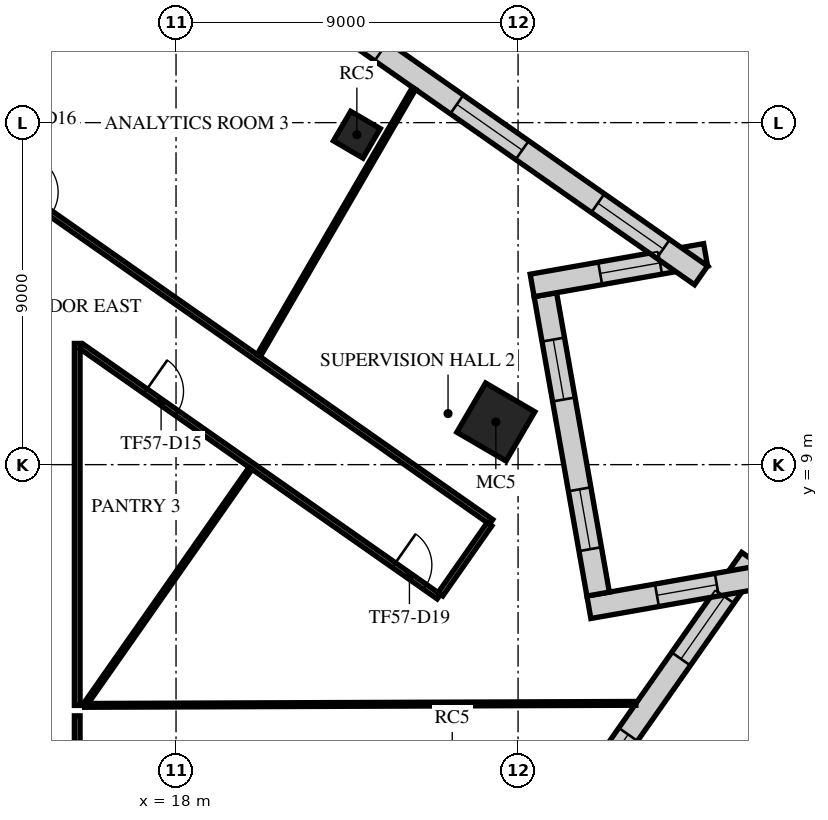
"""IFC4 building model, lengths in metres.
Left out: names, types, materials, properties, quantities, classifications, styles, units other than length and angle.
Written with IfcOpenShell. Run it as: python <this file> out.ifc"""

import sys

from ifc_helpers import new_model, si_unit, direction, frame, frame_2d, origin, origin_2d, place, context, subcontext, project, spatial, rectangle, extrude, element, fill, save


model = new_model("IFC4")
c1 = context("Model", 3, precision=1e-05, world=origin(), true_north=direction((0.0, 1.0)))
c2 = subcontext(c1, "Body", "Model", "MODEL_VIEW")
j1 = project(units=[si_unit("LENGTHUNIT", "METRE"), si_unit("PLANEANGLEUNIT", "RADIAN")], contexts=[c1])
p1 = place(None, origin())
s1 = spatial("IfcSite", under=j1, at=p1, CompositionType="ELEMENT")
p2 = place(p1, origin())
s2 = spatial("IfcBuilding", under=s1, at=p2, CompositionType="ELEMENT")
p3 = place(p2, frame((0.0, 0.0, 242.9)))
s3 = spatial("IfcBuildingStorey", under=s2, at=p3, CompositionType="ELEMENT", Elevation=242.9)
p4 = place(p3, frame((26.415, 10.122, -0.36), z_axis=(0.0, 0.0, 1.0), x_axis=(0.504643651291, 0.863327739165, 0.0)))
e1 = element("IfcColumn", 1, at=p4, inside=s3, PredefinedType="COLUMN", context=c2, shape_type="SweptSolid", body=[
    extrude(rectangle(XDim=1.5, YDim=1.5, at=origin_2d()), origin(), (0.0, 0.0, 1.0), 4.36),
])
p5 = place(p3, frame((22.758, 17.682, -0.36), z_axis=(0.0, 0.0, 1.0), x_axis=(0.504643651291, 0.863327739165, 0.0)))
e2 = element("IfcColumn", 2, at=p5, inside=s3, PredefinedType="COLUMN", context=c2, shape_type="SweptSolid", body=[
    extrude(rectangle(XDim=0.9, YDim=0.9, at=origin_2d()), origin(), (0.0, 0.0, 1.0), 4.36),
])
p6 = place(p3, frame((5.206, -33.362, 0.0), z_axis=(0.0, 0.0, 1.0), x_axis=(0.573577438409, 0.81915134264, 0.0)))
e3 = element("IfcWall", 3, at=p6, inside=s3, PredefinedType="STANDARD", context=c2, shape_type="SweptSolid", body=[
    extrude(rectangle(XDim=48.686, YDim=0.6, at=frame_2d((24.343, 0.0))), origin(), (0.0, 0.0, 1.0), 3.64),
])
p7 = place(p6, frame((1.213, 0.0, 0.9)))
e4 = element("IfcOpeningElement", 4, at=p7, cuts=e3, PredefinedType="OPENING", context=c2, shape_type="SweptSolid", body=[
    extrude(rectangle(XDim=2.0, YDim=2.1, at=frame_2d((1.0, 1.05))), frame((0.0, 0.31, 0.0), z_axis=(0.0, -1.0, 0.0), x_axis=(1.0, 0.0, 0.0)), (0.0, 0.0, 1.0), 0.62),
])
p8 = place(p6, frame((5.639, 0.0, 0.9)))
e5 = element("IfcOpeningElement", 5, at=p8, cuts=e3, PredefinedType="OPENING", context=c2, shape_type="SweptSolid", body=[
    extrude(rectangle(XDim=2.0, YDim=2.1, at=frame_2d((1.0, 1.05))), frame((0.0, 0.31, 0.0), z_axis=(0.0, -1.0, 0.0), x_axis=(1.0, 0.0, 0.0)), (0.0, 0.0, 1.0), 0.62),
])
p9 = place(p6, frame((10.065, 0.0, 0.9)))
e6 = element("IfcOpeningElement", 6, at=p9, cuts=e3, PredefinedType="OPENING", context=c2, shape_type="SweptSolid", body=[
    extrude(rectangle(XDim=2.0, YDim=2.1, at=frame_2d((1.0, 1.05))), frame((0.0, 0.31, 0.0), z_axis=(0.0, -1.0, 0.0), x_axis=(1.0, 0.0, 0.0)), (0.0, 0.0, 1.0), 0.62),
])
p10 = place(p6, frame((14.491, 0.0, 0.9)))
e7 = element("IfcOpeningElement", 7, at=p10, cuts=e3, PredefinedType="OPENING", context=c2, shape_type="SweptSolid", body=[
    extrude(rectangle(XDim=2.0, YDim=2.1, at=frame_2d((1.0, 1.05))), frame((0.0, 0.31, 0.0), z_axis=(0.0, -1.0, 0.0), x_axis=(1.0, 0.0, 0.0)), (0.0, 0.0, 1.0), 0.62),
])
p11 = place(p6, frame((18.917, 0.0, 0.9)))
e8 = element("IfcOpeningElement", 8, at=p11, cuts=e3, PredefinedType="OPENING", context=c2, shape_type="SweptSolid", body=[
    extrude(rectangle(XDim=2.0, YDim=2.1, at=frame_2d((1.0, 1.05))), frame((0.0, 0.31, 0.0), z_axis=(0.0, -1.0, 0.0), x_axis=(1.0, 0.0, 0.0)), (0.0, 0.0, 1.0), 0.62),
])
p12 = place(p6, frame((23.343, 0.0, 0.9)))
e9 = element("IfcOpeningElement", 9, at=p12, cuts=e3, PredefinedType="OPENING", context=c2, shape_type="SweptSolid", body=[
    extrude(rectangle(XDim=2.0, YDim=2.1, at=frame_2d((1.0, 1.05))), frame((0.0, 0.31, 0.0), z_axis=(0.0, -1.0, 0.0), x_axis=(1.0, 0.0, 0.0)), (0.0, 0.0, 1.0), 0.62),
])
p13 = place(p6, frame((27.769, 0.0, 0.9)))
e10 = element("IfcOpeningElement", 10, at=p13, cuts=e3, PredefinedType="OPENING", context=c2, shape_type="SweptSolid", body=[
    extrude(rectangle(XDim=2.0, YDim=2.1, at=frame_2d((1.0, 1.05))), frame((0.0, 0.31, 0.0), z_axis=(0.0, -1.0, 0.0), x_axis=(1.0, 0.0, 0.0)), (0.0, 0.0, 1.0), 0.62),
])
p14 = place(p6, frame((32.195, 0.0, 0.9)))
e11 = element("IfcOpeningElement", 11, at=p14, cuts=e3, PredefinedType="OPENING", context=c2, shape_type="SweptSolid", body=[
    extrude(rectangle(XDim=2.0, YDim=2.1, at=frame_2d((1.0, 1.05))), frame((0.0, 0.31, 0.0), z_axis=(0.0, -1.0, 0.0), x_axis=(1.0, 0.0, 0.0)), (0.0, 0.0, 1.0), 0.62),
])
p15 = place(p6, frame((36.621, 0.0, 0.9)))
e12 = element("IfcOpeningElement", 12, at=p15, cuts=e3, PredefinedType="OPENING", context=c2, shape_type="SweptSolid", body=[
    extrude(rectangle(XDim=2.0, YDim=2.1, at=frame_2d((1.0, 1.05))), frame((0.0, 0.31, 0.0), z_axis=(0.0, -1.0, 0.0), x_axis=(1.0, 0.0, 0.0)), (0.0, 0.0, 1.0), 0.62),
])
p16 = place(p6, frame((41.047, 0.0, 0.9)))
e13 = element("IfcOpeningElement", 13, at=p16, cuts=e3, PredefinedType="OPENING", context=c2, shape_type="SweptSolid", body=[
    extrude(rectangle(XDim=2.0, YDim=2.1, at=frame_2d((1.0, 1.05))), frame((0.0, 0.31, 0.0), z_axis=(0.0, -1.0, 0.0), x_axis=(1.0, 0.0, 0.0)), (0.0, 0.0, 1.0), 0.62),
])
p17 = place(p6, frame((45.473, 0.0, 0.9)))
e14 = element("IfcOpeningElement", 14, at=p17, cuts=e3, PredefinedType="OPENING", context=c2, shape_type="SweptSolid", body=[
    extrude(rectangle(XDim=2.0, YDim=2.1, at=frame_2d((1.0, 1.05))), frame((0.0, 0.31, 0.0), z_axis=(0.0, -1.0, 0.0), x_axis=(1.0, 0.0, 0.0)), (0.0, 0.0, 1.0), 0.62),
])
p18 = place(p3, frame((33.429, 6.052, 0.0), z_axis=(0.0, 0.0, 1.0), x_axis=(-0.984808997794, -0.173641118013, 0.0)))
e15 = element("IfcWall", 15, at=p18, inside=s3, PredefinedType="STANDARD", context=c2, shape_type="SweptSolid", body=[
    extrude(rectangle(XDim=4.635, YDim=0.6, at=frame_2d((2.318, 0.0))), origin(), (0.0, 0.0, 1.0), 3.64),
])
p19 = place(p18, frame((1.218, 0.0, 0.9)))
e16 = element("IfcOpeningElement", 16, at=p19, cuts=e15, PredefinedType="OPENING", context=c2, shape_type="SweptSolid", body=[
    extrude(rectangle(XDim=1.6, YDim=2.1, at=frame_2d((0.8, 1.05))), frame((0.0, 0.31, 0.0), z_axis=(0.0, -1.0, 0.0), x_axis=(1.0, 0.0, 0.0)), (0.0, 0.0, 1.0), 0.62),
])
p20 = place(p3, frame((29.107, 5.594, 0.0), z_axis=(0.0, 0.0, 1.0), x_axis=(-0.173640837858, 0.98480904719, 0.0)))
e17 = element("IfcWall", 17, at=p20, inside=s3, PredefinedType="STANDARD", context=c2, shape_type="SweptSolid", body=[
    extrude(rectangle(XDim=8.0, YDim=0.6, at=frame_2d((4.0, 0.0))), origin(), (0.0, 0.0, 1.0), 3.64),
])
p21 = place(p20, frame((1.2, 0.0, 0.9)))
e18 = element("IfcOpeningElement", 18, at=p21, cuts=e17, PredefinedType="OPENING", context=c2, shape_type="SweptSolid", body=[
    extrude(rectangle(XDim=1.6, YDim=2.1, at=frame_2d((0.8, 1.05))), frame((0.0, 0.31, 0.0), z_axis=(0.0, -1.0, 0.0), x_axis=(1.0, 0.0, 0.0)), (0.0, 0.0, 1.0), 0.62),
])
p22 = place(p20, frame((5.2, 0.0, 0.9)))
e19 = element("IfcOpeningElement", 19, at=p22, cuts=e17, PredefinedType="OPENING", context=c2, shape_type="SweptSolid", body=[
    extrude(rectangle(XDim=1.6, YDim=2.1, at=frame_2d((0.8, 1.05))), frame((0.0, 0.31, 0.0), z_axis=(0.0, -1.0, 0.0), x_axis=(1.0, 0.0, 0.0)), (0.0, 0.0, 1.0), 0.62),
])
p23 = place(p3, frame((27.37, 13.716, 0.0), z_axis=(0.0, 0.0, 1.0), x_axis=(0.984799990421, 0.173692195754, 0.0)))
e20 = element("IfcWall", 20, at=p23, inside=s3, PredefinedType="STANDARD", context=c2, shape_type="SweptSolid", body=[
    extrude(rectangle(XDim=4.636, YDim=0.6, at=frame_2d((2.318, 0.0))), origin(), (0.0, 0.0, 1.0), 3.64),
])
p24 = place(p23, frame((1.818, 0.0, 0.9)))
e21 = element("IfcOpeningElement", 21, at=p24, cuts=e20, PredefinedType="OPENING", context=c2, shape_type="SweptSolid", body=[
    extrude(rectangle(XDim=1.6, YDim=2.1, at=frame_2d((0.8, 1.05))), frame((0.0, 0.31, 0.0), z_axis=(0.0, -1.0, 0.0), x_axis=(1.0, 0.0, 0.0)), (0.0, 0.0, 1.0), 0.62),
])
p25 = place(p3, frame((31.815, 13.98, 0.0), z_axis=(0.0, 0.0, 1.0), x_axis=(-0.819152162902, 0.573576266955, 0.0)))
e22 = element("IfcWall", 22, at=p25, inside=s3, PredefinedType="STANDARD", context=c2, shape_type="SweptSolid", body=[
    extrude(rectangle(XDim=36.243, YDim=0.6, at=frame_2d((18.122, 0.0))), origin(), (0.0, 0.0, 1.0), 3.64),
])
p26 = place(p25, frame((1.215, 0.0, 0.9)))
e23 = element("IfcOpeningElement", 23, at=p26, cuts=e22, PredefinedType="OPENING", context=c2, shape_type="SweptSolid", body=[
    extrude(rectangle(XDim=2.1, YDim=2.1, at=frame_2d((1.05, 1.05))), frame((0.0, 0.31, 0.0), z_axis=(0.0, -1.0, 0.0), x_axis=(1.0, 0.0, 0.0)), (0.0, 0.0, 1.0), 0.62),
])
p27 = place(p25, frame((5.746, 0.0, 0.9)))
e24 = element("IfcOpeningElement", 24, at=p27, cuts=e22, PredefinedType="OPENING", context=c2, shape_type="SweptSolid", body=[
    extrude(rectangle(XDim=2.1, YDim=2.1, at=frame_2d((1.05, 1.05))), frame((0.0, 0.31, 0.0), z_axis=(0.0, -1.0, 0.0), x_axis=(1.0, 0.0, 0.0)), (0.0, 0.0, 1.0), 0.62),
])
p28 = place(p25, frame((10.276, 0.0, 0.9)))
e25 = element("IfcOpeningElement", 25, at=p28, cuts=e22, PredefinedType="OPENING", context=c2, shape_type="SweptSolid", body=[
    extrude(rectangle(XDim=2.1, YDim=2.1, at=frame_2d((1.05, 1.05))), frame((0.0, 0.31, 0.0), z_axis=(0.0, -1.0, 0.0), x_axis=(1.0, 0.0, 0.0)), (0.0, 0.0, 1.0), 0.62),
])
p29 = place(p25, frame((14.806, 0.0, 0.9)))
e26 = element("IfcOpeningElement", 26, at=p29, cuts=e22, PredefinedType="OPENING", context=c2, shape_type="SweptSolid", body=[
    extrude(rectangle(XDim=2.1, YDim=2.1, at=frame_2d((1.05, 1.05))), frame((0.0, 0.31, 0.0), z_axis=(0.0, -1.0, 0.0), x_axis=(1.0, 0.0, 0.0)), (0.0, 0.0, 1.0), 0.62),
])
p30 = place(p25, frame((19.337, 0.0, 0.9)))
e27 = element("IfcOpeningElement", 27, at=p30, cuts=e22, PredefinedType="OPENING", context=c2, shape_type="SweptSolid", body=[
    extrude(rectangle(XDim=2.1, YDim=2.1, at=frame_2d((1.05, 1.05))), frame((0.0, 0.31, 0.0), z_axis=(0.0, -1.0, 0.0), x_axis=(1.0, 0.0, 0.0)), (0.0, 0.0, 1.0), 0.62),
])
p31 = place(p25, frame((23.867, 0.0, 0.9)))
e28 = element("IfcOpeningElement", 28, at=p31, cuts=e22, PredefinedType="OPENING", context=c2, shape_type="SweptSolid", body=[
    extrude(rectangle(XDim=2.1, YDim=2.1, at=frame_2d((1.05, 1.05))), frame((0.0, 0.31, 0.0), z_axis=(0.0, -1.0, 0.0), x_axis=(1.0, 0.0, 0.0)), (0.0, 0.0, 1.0), 0.62),
])
p32 = place(p25, frame((28.398, 0.0, 0.9)))
e29 = element("IfcOpeningElement", 29, at=p32, cuts=e22, PredefinedType="OPENING", context=c2, shape_type="SweptSolid", body=[
    extrude(rectangle(XDim=2.1, YDim=2.1, at=frame_2d((1.05, 1.05))), frame((0.0, 0.31, 0.0), z_axis=(0.0, -1.0, 0.0), x_axis=(1.0, 0.0, 0.0)), (0.0, 0.0, 1.0), 0.62),
])
p33 = place(p25, frame((32.928, 0.0, 0.9)))
e30 = element("IfcOpeningElement", 30, at=p33, cuts=e22, PredefinedType="OPENING", context=c2, shape_type="SweptSolid", body=[
    extrude(rectangle(XDim=2.1, YDim=2.1, at=frame_2d((1.05, 1.05))), frame((0.0, 0.31, 0.0), z_axis=(0.0, -1.0, 0.0), x_axis=(1.0, 0.0, 0.0)), (0.0, 0.0, 1.0), 0.62),
])
p34 = place(p3, frame((-1.89, 27.226, 0.0), z_axis=(0.0, 0.0, 1.0), x_axis=(0.819163235761, -0.573560452941, 0.0)))
e31 = element("IfcWall", 31, at=p34, inside=s3, PredefinedType="PARTITIONING", context=c2, shape_type="SweptSolid", body=[
    extrude(rectangle(XDim=34.403, YDim=0.15, at=frame_2d((17.202, 0.0))), origin(), (0.0, 0.0, 1.0), 3.24),
])
p35 = place(p34, frame((7.427, 0.0, 0.0)))
e32 = element("IfcOpeningElement", 32, at=p35, cuts=e31, PredefinedType="OPENING", context=c2, shape_type="SweptSolid", body=[
    extrude(rectangle(XDim=1.0, YDim=2.1, at=frame_2d((0.5, 1.05))), frame((0.0, 0.085, 0.0), z_axis=(0.0, -1.0, 0.0), x_axis=(1.0, 0.0, 0.0)), (0.0, 0.0, 1.0), 0.17),
])
p36 = place(p34, frame((15.173, 0.0, 0.0)))
e33 = element("IfcOpeningElement", 33, at=p36, cuts=e31, PredefinedType="OPENING", context=c2, shape_type="SweptSolid", body=[
    extrude(rectangle(XDim=1.0, YDim=2.1, at=frame_2d((0.5, 1.05))), frame((0.0, 0.085, 0.0), z_axis=(0.0, -1.0, 0.0), x_axis=(1.0, 0.0, 0.0)), (0.0, 0.0, 1.0), 0.17),
])
p37 = place(p34, frame((19.273, 0.0, 0.0)))
e34 = element("IfcOpeningElement", 34, at=p37, cuts=e31, PredefinedType="OPENING", context=c2, shape_type="SweptSolid", body=[
    extrude(rectangle(XDim=1.0, YDim=2.1, at=frame_2d((0.5, 1.05))), frame((0.0, 0.085, 0.0), z_axis=(0.0, -1.0, 0.0), x_axis=(1.0, 0.0, 0.0)), (0.0, 0.0, 1.0), 0.17),
])
p38 = place(p3, frame((15.4, -15.325, 0.0), z_axis=(0.0, 0.0, 1.0), x_axis=(0.0, 1.0, 0.0)))
e35 = element("IfcWall", 35, at=p38, inside=s3, PredefinedType="PARTITIONING", context=c2, shape_type="SweptSolid", body=[
    extrude(rectangle(XDim=17.715, YDim=0.15, at=frame_2d((8.857, 0.0))), origin(), (0.0, 0.0, 1.0), 3.24),
])
p39 = place(p38, frame((7.812, 0.0, 0.0)))
e36 = element("IfcOpeningElement", 36, at=p39, cuts=e35, PredefinedType="OPENING", context=c2, shape_type="SweptSolid", body=[
    extrude(rectangle(XDim=1.0, YDim=2.1, at=frame_2d((0.5, 1.05))), frame((0.0, 0.085, 0.0), z_axis=(0.0, -1.0, 0.0), x_axis=(1.0, 0.0, 0.0)), (0.0, 0.0, 1.0), 0.17),
])
p40 = place(p38, frame((15.123, 0.0, 0.0)))
e37 = element("IfcOpeningElement", 37, at=p40, cuts=e35, PredefinedType="OPENING", context=c2, shape_type="SweptSolid", body=[
    extrude(rectangle(XDim=1.0, YDim=2.1, at=frame_2d((0.5, 1.05))), frame((0.0, 0.085, 0.0), z_axis=(0.0, -1.0, 0.0), x_axis=(1.0, 0.0, 0.0)), (0.0, 0.0, 1.0), 0.17),
])
p41 = place(p3, frame((15.4, 2.664, 0.0), z_axis=(0.0, 0.0, 1.0), x_axis=(0.0, 1.0, 0.0)))
e38 = element("IfcWall", 38, at=p41, inside=s3, PredefinedType="PARTITIONING", context=c2, shape_type="SweptSolid", body=[
    extrude(rectangle(XDim=9.526, YDim=0.15, at=frame_2d((4.763, 0.0))), origin(), (0.0, 0.0, 1.0), 3.24),
])
p42 = place(p3, frame((15.518, 12.107, 0.0), z_axis=(0.0, 0.0, 1.0), x_axis=(0.819171924474, -0.573548043457, 0.0)))
e39 = element("IfcWall", 39, at=p42, inside=s3, PredefinedType="PARTITIONING", context=c2, shape_type="SweptSolid", body=[
    extrude(rectangle(XDim=11.471, YDim=0.15, at=frame_2d((5.736, 0.0))), origin(), (0.0, 0.0, 1.0), 3.24),
])
p43 = place(p42, frame((2.05, 0.0, 0.0)))
e40 = element("IfcOpeningElement", 40, at=p43, cuts=e39, PredefinedType="OPENING", context=c2, shape_type="SweptSolid", body=[
    extrude(rectangle(XDim=1.0, YDim=2.1, at=frame_2d((0.5, 1.05))), frame((0.0, 0.085, 0.0), z_axis=(0.0, -1.0, 0.0), x_axis=(1.0, 0.0, 0.0)), (0.0, 0.0, 1.0), 0.17),
])
p44 = place(p42, frame((10.027, 0.0, 0.0)))
e41 = element("IfcOpeningElement", 41, at=p44, cuts=e39, PredefinedType="OPENING", context=c2, shape_type="SweptSolid", body=[
    extrude(rectangle(XDim=1.0, YDim=2.1, at=frame_2d((0.5, 1.05))), frame((0.0, 0.085, 0.0), z_axis=(0.0, -1.0, 0.0), x_axis=(1.0, 0.0, 0.0)), (0.0, 0.0, 1.0), 0.17),
])
p45 = place(p3, frame((24.958, 5.589, 0.0), z_axis=(0.0, 0.0, 1.0), x_axis=(0.573680754751, 0.819078989859, 0.0)))
e42 = element("IfcWall", 42, at=p45, inside=s3, PredefinedType="PARTITIONING", context=c2, shape_type="SweptSolid", body=[
    extrude(rectangle(XDim=2.25, YDim=0.15, at=frame_2d((1.125, 0.0))), origin(), (0.0, 0.0, 1.0), 3.24),
])
p46 = place(p3, frame((12.876, 16.985, 0.0), z_axis=(0.0, 0.0, 1.0), x_axis=(0.487744732035, 0.872986297929, 0.0)))
e43 = element("IfcWall", 43, at=p46, inside=s3, PredefinedType="PARTITIONING", context=c2, shape_type="SweptSolid", body=[
    extrude(rectangle(XDim=8.141, YDim=0.1, at=frame_2d((4.07, 0.0))), origin(), (0.0, 0.0, 1.0), 3.24),
])
p47 = place(p3, frame((15.593, 2.665, 0.0), z_axis=(0.0, 0.0, 1.0), x_axis=(0.999993270933, 0.003668526741, 0.0)))
e44 = element("IfcWall", 44, at=p47, inside=s3, PredefinedType="PARTITIONING", context=c2, shape_type="SweptSolid", body=[
    extrude(rectangle(XDim=14.508, YDim=0.1, at=frame_2d((7.254, 0.0))), origin(), (0.0, 0.0, 1.0), 3.64),
])
p48 = place(p3, frame((15.648, 2.744, 0.0), z_axis=(0.0, 0.0, 1.0), x_axis=(0.57357562998, 0.819152608915, 0.0)))
e45 = element("IfcWall", 45, at=p48, inside=s3, PredefinedType="PARTITIONING", context=c2, shape_type="SweptSolid", body=[
    extrude(rectangle(XDim=7.521, YDim=0.1, at=frame_2d((3.76, 0.0))), origin(), (0.0, 0.0, 1.0), 3.24),
])
p49 = place(p3, frame((20.177, 11.873, 0.0), z_axis=(0.0, 0.0, 1.0), x_axis=(0.502475319919, 0.864591552626, 0.0)))
e46 = element("IfcWall", 46, at=p49, inside=s3, PredefinedType="PARTITIONING", context=c2, shape_type="SweptSolid", body=[
    extrude(rectangle(XDim=8.128, YDim=0.1, at=frame_2d((4.064, 0.0))), origin(), (0.0, 0.0, 1.0), 3.24),
])
p50 = place(p16, origin())
e47 = element("IfcWindow", 47, at=p50, inside=s3, PartitioningType="SINGLE_PANEL", PredefinedType="WINDOW", context=c2, shape_type="SweptSolid", body=[
    extrude(rectangle(XDim=2.0, YDim=2.1, at=frame_2d((1.0, 1.05))), frame((0.0, 0.03, 0.0), z_axis=(0.0, -1.0, 0.0), x_axis=(1.0, 0.0, 0.0)), (0.0, 0.0, 1.0), 0.06),
])
fill(e13, e47)
p51 = place(p17, origin())
e48 = element("IfcWindow", 48, at=p51, inside=s3, PartitioningType="SINGLE_PANEL", PredefinedType="WINDOW", context=c2, shape_type="SweptSolid", body=[
    extrude(rectangle(XDim=2.0, YDim=2.1, at=frame_2d((1.0, 1.05))), frame((0.0, 0.03, 0.0), z_axis=(0.0, -1.0, 0.0), x_axis=(1.0, 0.0, 0.0)), (0.0, 0.0, 1.0), 0.06),
])
fill(e14, e48)
p52 = place(p19, origin())
e49 = element("IfcWindow", 49, at=p52, inside=s3, PartitioningType="SINGLE_PANEL", PredefinedType="WINDOW", context=c2, shape_type="SweptSolid", body=[
    extrude(rectangle(XDim=1.6, YDim=2.1, at=frame_2d((0.8, 1.05))), frame((0.0, 0.03, 0.0), z_axis=(0.0, -1.0, 0.0), x_axis=(1.0, 0.0, 0.0)), (0.0, 0.0, 1.0), 0.06),
])
fill(e16, e49)
p53 = place(p21, origin())
e50 = element("IfcWindow", 50, at=p53, inside=s3, PartitioningType="SINGLE_PANEL", PredefinedType="WINDOW", context=c2, shape_type="SweptSolid", body=[
    extrude(rectangle(XDim=1.6, YDim=2.1, at=frame_2d((0.8, 1.05))), frame((0.0, 0.03, 0.0), z_axis=(0.0, -1.0, 0.0), x_axis=(1.0, 0.0, 0.0)), (0.0, 0.0, 1.0), 0.06),
])
fill(e18, e50)
p54 = place(p22, origin())
e51 = element("IfcWindow", 51, at=p54, inside=s3, PartitioningType="SINGLE_PANEL", PredefinedType="WINDOW", context=c2, shape_type="SweptSolid", body=[
    extrude(rectangle(XDim=1.6, YDim=2.1, at=frame_2d((0.8, 1.05))), frame((0.0, 0.03, 0.0), z_axis=(0.0, -1.0, 0.0), x_axis=(1.0, 0.0, 0.0)), (0.0, 0.0, 1.0), 0.06),
])
fill(e19, e51)
p55 = place(p24, origin())
e52 = element("IfcWindow", 52, at=p55, inside=s3, PartitioningType="SINGLE_PANEL", PredefinedType="WINDOW", context=c2, shape_type="SweptSolid", body=[
    extrude(rectangle(XDim=1.6, YDim=2.1, at=frame_2d((0.8, 1.05))), frame((0.0, 0.03, 0.0), z_axis=(0.0, -1.0, 0.0), x_axis=(1.0, 0.0, 0.0)), (0.0, 0.0, 1.0), 0.06),
])
fill(e21, e52)
p56 = place(p26, origin())
e53 = element("IfcWindow", 53, at=p56, inside=s3, PartitioningType="SINGLE_PANEL", PredefinedType="WINDOW", context=c2, shape_type="SweptSolid", body=[
    extrude(rectangle(XDim=2.1, YDim=2.1, at=frame_2d((1.05, 1.05))), frame((0.0, 0.03, 0.0), z_axis=(0.0, -1.0, 0.0), x_axis=(1.0, 0.0, 0.0)), (0.0, 0.0, 1.0), 0.06),
])
fill(e23, e53)
p57 = place(p27, origin())
e54 = element("IfcWindow", 54, at=p57, inside=s3, PartitioningType="SINGLE_PANEL", PredefinedType="WINDOW", context=c2, shape_type="SweptSolid", body=[
    extrude(rectangle(XDim=2.1, YDim=2.1, at=frame_2d((1.05, 1.05))), frame((0.0, 0.03, 0.0), z_axis=(0.0, -1.0, 0.0), x_axis=(1.0, 0.0, 0.0)), (0.0, 0.0, 1.0), 0.06),
])
fill(e24, e54)
p58 = place(p28, origin())
e55 = element("IfcWindow", 55, at=p58, inside=s3, PartitioningType="SINGLE_PANEL", PredefinedType="WINDOW", context=c2, shape_type="SweptSolid", body=[
    extrude(rectangle(XDim=2.1, YDim=2.1, at=frame_2d((1.05, 1.05))), frame((0.0, 0.03, 0.0), z_axis=(0.0, -1.0, 0.0), x_axis=(1.0, 0.0, 0.0)), (0.0, 0.0, 1.0), 0.06),
])
fill(e25, e55)
p59 = place(p43, frame((1.0, 0.0, 0.0), z_axis=(0.0, 0.0, 1.0), x_axis=(-1.0, 0.0, 0.0)))
e56 = element("IfcDoor", 56, at=p59, inside=s3, OperationType="SINGLE_SWING_LEFT", PredefinedType="DOOR", context=c2, shape_type="SweptSolid", body=[
    extrude(rectangle(XDim=1.0, YDim=2.1, at=frame_2d((0.5, 1.05))), frame((0.0, 0.025, 0.0), z_axis=(0.0, -1.0, 0.0), x_axis=(1.0, 0.0, 0.0)), (0.0, 0.0, 1.0), 0.05),
])
fill(e40, e56)
p60 = place(p44, frame((1.0, 0.0, 0.0), z_axis=(0.0, 0.0, 1.0), x_axis=(-1.0, 0.0, 0.0)))
e57 = element("IfcDoor", 57, at=p60, inside=s3, OperationType="SINGLE_SWING_LEFT", PredefinedType="DOOR", context=c2, shape_type="SweptSolid", body=[
    extrude(rectangle(XDim=1.0, YDim=2.1, at=frame_2d((0.5, 1.05))), frame((0.0, 0.025, 0.0), z_axis=(0.0, -1.0, 0.0), x_axis=(1.0, 0.0, 0.0)), (0.0, 0.0, 1.0), 0.05),
])
fill(e41, e57)
save(model, sys.argv[1])
